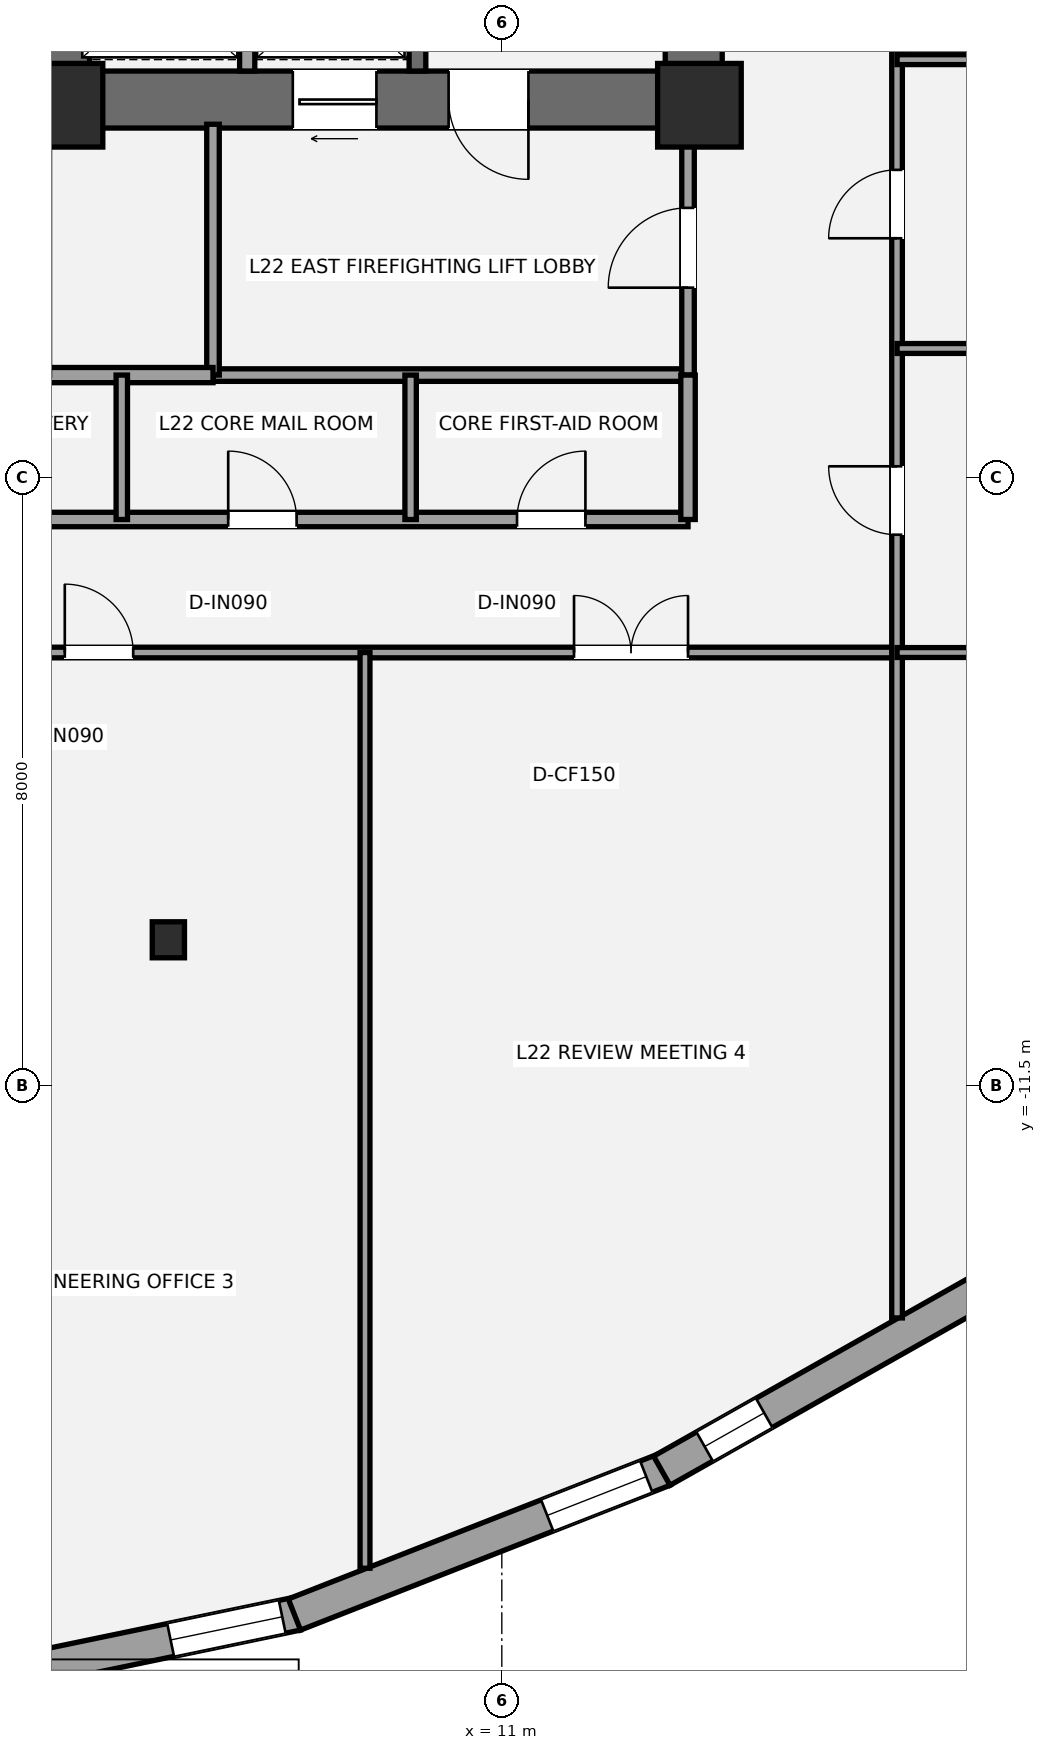
"""IFC4 building model, lengths in metres.
Left out: names, types, materials, properties, quantities, classifications, styles, units other than length and angle.
Written with IfcOpenShell. Run it as: python <this file> out.ifc"""

import sys

from ifc_helpers import new_model, si_unit, direction, frame, frame_2d, origin, origin_2d, place, context, subcontext, project, spatial, rectangle, i_section, extrude, element, fill, save


model = new_model("IFC4")
c1 = context("Model", 3, precision=1e-05, world=origin(), true_north=direction((0.0, 1.0)))
c2 = subcontext(c1, "Body", "Model", "MODEL_VIEW")
j1 = project(units=[si_unit("LENGTHUNIT", "METRE"), si_unit("PLANEANGLEUNIT", "RADIAN")], contexts=[c1])
p1 = place(None, origin())
s1 = spatial("IfcSite", under=j1, at=p1, CompositionType="ELEMENT")
p2 = place(p1, origin())
s2 = spatial("IfcBuilding", under=s1, at=p2, CompositionType="ELEMENT")
p3 = place(p2, frame((0.0, 0.0, 86.1)))
s3 = spatial("IfcBuildingStorey", under=s2, at=p3, CompositionType="ELEMENT", Elevation=86.1)
p4 = place(p3, frame((13.525, 1.1, 0.0), z_axis=(0.0, 0.0, 1.0), x_axis=(0.0, 1.0, 0.0)))
e1 = element("IfcWall", 1, at=p4, inside=s3, PredefinedType="SHEAR", context=c2, shape_type="SweptSolid", body=[
    extrude(rectangle(XDim=8.65, YDim=0.75, at=frame_2d((4.325, 0.0))), origin(), (0.0, 0.0, 1.0), 3.5),
])
p5 = place(p3, frame((13.9, 1.475, 0.0), z_axis=(0.0, 0.0, 1.0), x_axis=(-1.0, 0.0, 0.0)))
e2 = element("IfcWall", 2, at=p5, inside=s3, PredefinedType="SHEAR", context=c2, shape_type="SweptSolid", body=[
    extrude(rectangle(XDim=9.075, YDim=0.75, at=frame_2d((4.538, 0.0))), origin(), (0.0, 0.0, 1.0), 3.5),
])
p6 = place(p5, frame((2.55, 0.0, 0.0)))
e3 = element("IfcOpeningElement", 3, at=p6, cuts=e2, PredefinedType="OPENING", context=c2, shape_type="SweptSolid", body=[
    extrude(rectangle(XDim=1.05, YDim=2.15, at=frame_2d((0.525, 1.075))), frame((0.0, 0.385, 0.0), z_axis=(0.0, -1.0, 0.0), x_axis=(1.0, 0.0, 0.0)), (0.0, 0.0, 1.0), 0.77),
])
p7 = place(p5, frame((4.55, 0.0, 0.0)))
e4 = element("IfcOpeningElement", 4, at=p7, cuts=e2, PredefinedType="OPENING", context=c2, shape_type="SweptSolid", body=[
    extrude(rectangle(XDim=1.1, YDim=2.2, at=frame_2d((0.55, 1.1))), frame((0.0, 0.385, 0.0), z_axis=(0.0, -1.0, 0.0), x_axis=(1.0, 0.0, 0.0)), (0.0, 0.0, 1.0), 0.77),
])
p8 = place(p3, frame((5.2, 1.1, 0.0), z_axis=(0.0, 0.0, 1.0), x_axis=(0.0, 1.0, 0.0)))
e5 = element("IfcWall", 5, at=p8, inside=s3, PredefinedType="SHEAR", context=c2, shape_type="SweptSolid", body=[
    extrude(rectangle(XDim=2.7, YDim=0.75, at=frame_2d((1.35, 0.0))), origin(), (0.0, 0.0, 1.0), 3.5),
])
p9 = place(p3, frame((9.89, 1.85, 0.0), z_axis=(0.0, 0.0, 1.0), x_axis=(0.0, 1.0, 0.0)))
e6 = element("IfcWall", 6, at=p9, inside=s3, PredefinedType="SHEAR", context=c2, shape_type="SweptSolid", body=[
    extrude(rectangle(XDim=7.15, YDim=0.22, at=frame_2d((3.575, 0.0))), origin(), (0.0, 0.0, 1.0), 3.5),
])
for number, where, z_axis, x_axis in (
    (7, (5.2, 1.4, 0.0), (0.0, 0.0, 1.0), (1.0, 0.0, 0.0)),
    (8, (13.6, 1.4, 0.0), (0.0, 0.0, 1.0), (1.0, 0.0, 0.0)),
):
    element("IfcColumn", number, at=place(p3, frame(where, z_axis=z_axis, x_axis=x_axis)), inside=s3, PredefinedType="COLUMN", context=c2, shape_type="SweptSolid", body=[
        extrude(rectangle(XDim=1.1, YDim=1.1, at=origin_2d()), origin(), (0.0, 0.0, 1.0), 3.5),
    ])
p10 = place(p3, frame((6.613, -9.579, 0.0), z_axis=(0.0, 0.0, 1.0), x_axis=(1.0, 0.0, 0.0)))
e9 = element("IfcColumn", 9, at=p10, inside=s3, PredefinedType="COLUMN", context=c2, shape_type="SweptSolid", body=[
    extrude(i_section(OverallWidth=0.424, OverallDepth=0.474, WebThickness=0.048, FlangeThickness=0.077, at=origin_2d()), origin(), (0.0, 0.0, 1.0), 3.5),
])
p11 = place(p3, frame((8.307, -18.446, 0.0), z_axis=(0.0, 0.0, 1.0), x_axis=(-0.979118590293, -0.20328990664, 0.0)))
e10 = element("IfcWall", 10, at=p11, inside=s3, PredefinedType="STANDARD", context=c2, shape_type="SweptSolid", body=[
    extrude(rectangle(XDim=5.592, YDim=0.44, at=frame_2d((2.796, 0.0))), origin(), (0.0, 0.0, 1.0), 2.528),
])
p12 = place(p11, frame((0.2, 0.0, 0.65)))
e11 = element("IfcOpeningElement", 11, at=p12, cuts=e10, PredefinedType="OPENING", context=c2, shape_type="SweptSolid", body=[
    extrude(rectangle(XDim=1.5, YDim=1.7, at=frame_2d((0.75, 0.85))), frame((0.0, 0.23, 0.0), z_axis=(0.0, -1.0, 0.0), x_axis=(1.0, 0.0, 0.0)), (0.0, 0.0, 1.0), 0.46),
])
p13 = place(p3, frame((13.133, -16.551, 0.0), z_axis=(0.0, 0.0, 1.0), x_axis=(-0.931059171354, -0.364868222017, 0.0)))
e12 = element("IfcWall", 12, at=p13, inside=s3, PredefinedType="STANDARD", context=c2, shape_type="SweptSolid", body=[
    extrude(rectangle(XDim=5.222, YDim=0.44, at=frame_2d((2.611, 0.0))), origin(), (0.0, 0.0, 1.0), 2.528),
])
p14 = place(p13, frame((0.25, 0.0, 0.58)))
e13 = element("IfcOpeningElement", 13, at=p14, cuts=e12, PredefinedType="OPENING", context=c2, shape_type="SweptSolid", body=[
    extrude(rectangle(XDim=1.4, YDim=1.55, at=frame_2d((0.7, 0.775))), frame((0.0, 0.23, 0.0), z_axis=(0.0, -1.0, 0.0), x_axis=(1.0, 0.0, 0.0)), (0.0, 0.0, 1.0), 0.46),
])
p15 = place(p3, frame((17.306, -14.191, 0.0), z_axis=(0.0, 0.0, 1.0), x_axis=(-0.870732411856, -0.491757121903, 0.0)))
e14 = element("IfcWall", 14, at=p15, inside=s3, PredefinedType="STANDARD", context=c2, shape_type="SweptSolid", body=[
    extrude(rectangle(XDim=4.825, YDim=0.44, at=frame_2d((2.413, 0.0))), origin(), (0.0, 0.0, 1.0), 2.528),
])
p16 = place(p15, frame((3.278, 0.0, 0.58)))
e15 = element("IfcOpeningElement", 15, at=p16, cuts=e14, PredefinedType="OPENING", context=c2, shape_type="SweptSolid", body=[
    extrude(rectangle(XDim=0.9, YDim=1.35, at=frame_2d((0.45, 0.675))), frame((0.0, 0.23, 0.0), z_axis=(0.0, -1.0, 0.0), x_axis=(1.0, 0.0, 0.0)), (0.0, 0.0, 1.0), 0.46),
])
p17 = place(p3, frame((7.2, -2.15, 0.0), z_axis=(0.0, 0.0, 1.0), x_axis=(1.0, 0.0, 0.0)))
e16 = element("IfcWall", 16, at=p17, inside=s3, PredefinedType="PARTITIONING", context=c2, shape_type="SweptSolid", body=[
    extrude(rectangle(XDim=6.25, YDim=0.165, at=frame_2d((3.125, 0.0))), origin(), (0.0, 0.0, 1.0), 3.31),
])
p18 = place(p3, frame((7.2, -2.15, 0.0), z_axis=(0.0, 0.0, 1.0), x_axis=(0.0, 1.0, 0.0)))
e17 = element("IfcWall", 17, at=p18, inside=s3, PredefinedType="PARTITIONING", context=c2, shape_type="SweptSolid", body=[
    extrude(rectangle(XDim=3.3, YDim=0.165, at=frame_2d((1.65, 0.0))), origin(), (0.0, 0.0, 1.0), 2.763),
])
p19 = place(p3, frame((13.45, -2.15, 0.0), z_axis=(0.0, 0.0, 1.0), x_axis=(0.0, 1.0, 0.0)))
e18 = element("IfcWall", 18, at=p19, inside=s3, PredefinedType="PARTITIONING", context=c2, shape_type="SweptSolid", body=[
    extrude(rectangle(XDim=3.3, YDim=0.165, at=frame_2d((1.65, 0.0))), origin(), (0.0, 0.0, 1.0), 2.763),
])
p20 = place(p19, frame((1.15, 0.0, 0.0)))
e19 = element("IfcOpeningElement", 19, at=p20, cuts=e18, PredefinedType="OPENING", context=c2, shape_type="SweptSolid", body=[
    extrude(rectangle(XDim=1.05, YDim=2.15, at=frame_2d((0.525, 1.075))), frame((0.0, 0.093, 0.0), z_axis=(0.0, -1.0, 0.0), x_axis=(1.0, 0.0, 0.0)), (0.0, 0.0, 1.0), 0.185),
])
p21 = place(p3, frame((4.95, -2.15, 0.0), z_axis=(0.0, 0.0, 1.0), x_axis=(1.0, 0.0, 0.0)))
e20 = element("IfcWall", 20, at=p21, inside=s3, PredefinedType="SOLIDWALL", context=c2, shape_type="SweptSolid", body=[
    extrude(rectangle(XDim=2.25, YDim=0.2, at=frame_2d((1.125, 0.0))), origin(), (0.0, 0.0, 1.0), 3.31),
])
p22 = place(p3, frame((7.65, 1.85, 0.0), z_axis=(0.0, 0.0, 1.0), x_axis=(0.0, 1.0, 0.0)))
e21 = element("IfcWall", 21, at=p22, inside=s3, PredefinedType="SOLIDWALL", context=c2, shape_type="SweptSolid", body=[
    extrude(rectangle(XDim=1.97, YDim=0.2, at=frame_2d((0.985, 0.0))), origin(), (0.0, 0.0, 1.0), 3.31),
])
p23 = place(p3, frame((2.1, -4.05, 0.0), z_axis=(0.0, 0.0, 1.0), x_axis=(1.0, 0.0, 0.0)))
e22 = element("IfcWall", 22, at=p23, inside=s3, PredefinedType="PLUMBINGWALL", context=c2, shape_type="SweptSolid", body=[
    extrude(rectangle(XDim=11.35, YDim=0.19, at=frame_2d((5.675, 0.0))), origin(), (0.0, 0.0, 1.0), 2.763),
])
p24 = place(p23, frame((1.4, 0.0, 0.0)))
e23 = element("IfcOpeningElement", 23, at=p24, cuts=e22, PredefinedType="OPENING", context=c2, shape_type="SweptSolid", body=[
    extrude(rectangle(XDim=0.9, YDim=2.1, at=frame_2d((0.45, 1.05))), frame((0.0, 0.105, 0.0), z_axis=(0.0, -1.0, 0.0), x_axis=(1.0, 0.0, 0.0)), (0.0, 0.0, 1.0), 0.21),
])
p25 = place(p23, frame((5.3, 0.0, 0.0)))
e24 = element("IfcOpeningElement", 24, at=p25, cuts=e22, PredefinedType="OPENING", context=c2, shape_type="SweptSolid", body=[
    extrude(rectangle(XDim=0.9, YDim=2.1, at=frame_2d((0.45, 1.05))), frame((0.0, 0.105, 0.0), z_axis=(0.0, -1.0, 0.0), x_axis=(1.0, 0.0, 0.0)), (0.0, 0.0, 1.0), 0.21),
])
p26 = place(p23, frame((9.1, 0.0, 0.0)))
e25 = element("IfcOpeningElement", 25, at=p26, cuts=e22, PredefinedType="OPENING", context=c2, shape_type="SweptSolid", body=[
    extrude(rectangle(XDim=0.9, YDim=2.1, at=frame_2d((0.45, 1.05))), frame((0.0, 0.105, 0.0), z_axis=(0.0, -1.0, 0.0), x_axis=(1.0, 0.0, 0.0)), (0.0, 0.0, 1.0), 0.21),
])
p27 = place(p3, frame((13.45, -4.05, 0.0), z_axis=(0.0, 0.0, 1.0), x_axis=(0.0, 1.0, 0.0)))
e26 = element("IfcWall", 26, at=p27, inside=s3, PredefinedType="PLUMBINGWALL", context=c2, shape_type="SweptSolid", body=[
    extrude(rectangle(XDim=1.9, YDim=0.19, at=frame_2d((0.95, 0.0))), origin(), (0.0, 0.0, 1.0), 3.31),
])
p28 = place(p3, frame((6.0, -4.05, 0.0), z_axis=(0.0, 0.0, 1.0), x_axis=(0.0, 1.0, 0.0)))
e27 = element("IfcWall", 27, at=p28, inside=s3, PredefinedType="PLUMBINGWALL", context=c2, shape_type="SweptSolid", body=[
    extrude(rectangle(XDim=1.9, YDim=0.15, at=frame_2d((0.95, 0.0))), origin(), (0.0, 0.0, 1.0), 2.751),
])
p29 = place(p3, frame((9.8, -4.05, 0.0), z_axis=(0.0, 0.0, 1.0), x_axis=(0.0, 1.0, 0.0)))
e28 = element("IfcWall", 28, at=p29, inside=s3, PredefinedType="PLUMBINGWALL", context=c2, shape_type="SweptSolid", body=[
    extrude(rectangle(XDim=1.9, YDim=0.15, at=frame_2d((0.95, 0.0))), origin(), (0.0, 0.0, 1.0), 3.31),
])
p30 = place(p3, frame((-16.2, -5.8, 0.0), z_axis=(0.0, 0.0, 1.0), x_axis=(1.0, 0.0, 0.0)))
e29 = element("IfcWall", 29, at=p30, inside=s3, PredefinedType="PARTITIONING", context=c2, shape_type="SweptSolid", body=[
    extrude(rectangle(XDim=32.4, YDim=0.14, at=frame_2d((16.2, 0.0))), origin(), (0.0, 0.0, 1.0), 2.763),
])
p31 = place(p30, frame((4.25, 0.0, 0.0)))
e30 = element("IfcOpeningElement", 30, at=p31, cuts=e29, PredefinedType="OPENING", context=c2, shape_type="SweptSolid", body=[
    extrude(rectangle(XDim=0.9, YDim=2.1, at=frame_2d((0.45, 1.05))), frame((0.0, 0.08, 0.0), z_axis=(0.0, -1.0, 0.0), x_axis=(1.0, 0.0, 0.0)), (0.0, 0.0, 1.0), 0.16),
])
p32 = place(p30, frame((13.15, 0.0, 0.0)))
e31 = element("IfcOpeningElement", 31, at=p32, cuts=e29, PredefinedType="OPENING", context=c2, shape_type="SweptSolid", body=[
    extrude(rectangle(XDim=1.5, YDim=2.15, at=frame_2d((0.75, 1.075))), frame((0.0, 0.08, 0.0), z_axis=(0.0, -1.0, 0.0), x_axis=(1.0, 0.0, 0.0)), (0.0, 0.0, 1.0), 0.16),
])
p33 = place(p30, frame((21.45, 0.0, 0.0)))
e32 = element("IfcOpeningElement", 32, at=p33, cuts=e29, PredefinedType="OPENING", context=c2, shape_type="SweptSolid", body=[
    extrude(rectangle(XDim=0.9, YDim=2.1, at=frame_2d((0.45, 1.05))), frame((0.0, 0.08, 0.0), z_axis=(0.0, -1.0, 0.0), x_axis=(1.0, 0.0, 0.0)), (0.0, 0.0, 1.0), 0.16),
])
p34 = place(p30, frame((28.15, 0.0, 0.0)))
e33 = element("IfcOpeningElement", 33, at=p34, cuts=e29, PredefinedType="OPENING", context=c2, shape_type="SweptSolid", body=[
    extrude(rectangle(XDim=1.5, YDim=2.15, at=frame_2d((0.75, 1.075))), frame((0.0, 0.08, 0.0), z_axis=(0.0, -1.0, 0.0), x_axis=(1.0, 0.0, 0.0)), (0.0, 0.0, 1.0), 0.16),
])
p35 = place(p3, frame((16.2, -14.554, 0.0), z_axis=(0.0, 0.0, 1.0), x_axis=(0.0, 1.0, 0.0)))
e34 = element("IfcWall", 34, at=p35, inside=s3, PredefinedType="PARTITIONING", context=c2, shape_type="SweptSolid", body=[
    extrude(rectangle(XDim=22.104, YDim=0.14, at=frame_2d((11.052, 0.0))), origin(), (0.0, 0.0, 1.0), 2.751),
])
p36 = place(p35, frame((10.304, 0.0, 0.0)))
e35 = element("IfcOpeningElement", 35, at=p36, cuts=e34, PredefinedType="OPENING", context=c2, shape_type="SweptSolid", body=[
    extrude(rectangle(XDim=0.9, YDim=2.1, at=frame_2d((0.45, 1.05))), frame((0.0, 0.08, 0.0), z_axis=(0.0, -1.0, 0.0), x_axis=(1.0, 0.0, 0.0)), (0.0, 0.0, 1.0), 0.16),
])
p37 = place(p35, frame((14.204, 0.0, 0.0)))
e36 = element("IfcOpeningElement", 36, at=p37, cuts=e34, PredefinedType="OPENING", context=c2, shape_type="SweptSolid", body=[
    extrude(rectangle(XDim=0.9, YDim=2.1, at=frame_2d((0.45, 1.05))), frame((0.0, 0.08, 0.0), z_axis=(0.0, -1.0, 0.0), x_axis=(1.0, 0.0, 0.0)), (0.0, 0.0, 1.0), 0.16),
])
p38 = place(p35, frame((17.704, 0.0, 0.0)))
e37 = element("IfcOpeningElement", 37, at=p38, cuts=e34, PredefinedType="OPENING", context=c2, shape_type="SweptSolid", body=[
    extrude(rectangle(XDim=0.9, YDim=2.1, at=frame_2d((0.45, 1.05))), frame((0.0, 0.08, 0.0), z_axis=(0.0, -1.0, 0.0), x_axis=(1.0, 0.0, 0.0)), (0.0, 0.0, 1.0), 0.16),
])
p39 = place(p35, frame((20.479, 0.0, 0.0)))
e38 = element("IfcOpeningElement", 38, at=p39, cuts=e34, PredefinedType="OPENING", context=c2, shape_type="SweptSolid", body=[
    extrude(rectangle(XDim=0.9, YDim=2.1, at=frame_2d((0.45, 1.05))), frame((0.0, 0.08, 0.0), z_axis=(0.0, -1.0, 0.0), x_axis=(1.0, 0.0, 0.0)), (0.0, 0.0, 1.0), 0.16),
])
p40 = place(p3, frame((9.2, -17.847, 0.0), z_axis=(0.0, 0.0, 1.0), x_axis=(0.0, 1.0, 0.0)))
e39 = element("IfcWall", 39, at=p40, inside=s3, PredefinedType="PARTITIONING", context=c2, shape_type="SweptSolid", body=[
    extrude(rectangle(XDim=12.047, YDim=0.13, at=frame_2d((6.024, 0.0))), origin(), (0.0, 0.0, 1.0), 3.31),
])
p41 = place(p3, frame((16.2, -5.8, 0.0), z_axis=(0.0, 0.0, 1.0), x_axis=(1.0, 0.0, 0.0)))
e40 = element("IfcWall", 40, at=p41, inside=s3, PredefinedType="PARTITIONING", context=c2, shape_type="SweptSolid", body=[
    extrude(rectangle(XDim=10.624, YDim=0.13, at=frame_2d((5.312, 0.0))), origin(), (0.0, 0.0, 1.0), 2.688),
])
p42 = place(p41, frame((1.73, 0.0, 0.0)))
e41 = element("IfcOpeningElement", 41, at=p42, cuts=e40, PredefinedType="OPENING", context=c2, shape_type="SweptSolid", body=[
    extrude(rectangle(XDim=0.9, YDim=2.1, at=frame_2d((0.45, 1.05))), frame((0.0, 0.075, 0.0), z_axis=(0.0, -1.0, 0.0), x_axis=(1.0, 0.0, 0.0)), (0.0, 0.0, 1.0), 0.15),
])
p43 = place(p3, frame((16.2, -1.8, 0.0), z_axis=(0.0, 0.0, 1.0), x_axis=(1.0, 0.0, 0.0)))
e42 = element("IfcWall", 42, at=p43, inside=s3, PredefinedType="PARTITIONING", context=c2, shape_type="SweptSolid", body=[
    extrude(rectangle(XDim=12.56, YDim=0.13, at=frame_2d((6.28, 0.0))), origin(), (0.0, 0.0, 1.0), 2.751),
])
p44 = place(p3, frame((16.2, 2.0, 0.0), z_axis=(0.0, 0.0, 1.0), x_axis=(1.0, 0.0, 0.0)))
e43 = element("IfcWall", 43, at=p44, inside=s3, PredefinedType="PARTITIONING", context=c2, shape_type="SweptSolid", body=[
    extrude(rectangle(XDim=12.494, YDim=0.13, at=frame_2d((6.247, 0.0))), origin(), (0.0, 0.0, 1.0), 2.751),
])
p45 = place(p12, origin())
e44 = element("IfcWindow", 44, at=p45, inside=s3, PartitioningType="SINGLE_PANEL", PredefinedType="WINDOW", context=c2, shape_type="SweptSolid", body=[
    extrude(rectangle(XDim=1.5, YDim=1.7, at=frame_2d((0.75, 0.85))), frame((0.0, -0.01, 0.0), z_axis=(0.0, -1.0, 0.0), x_axis=(1.0, 0.0, 0.0)), (0.0, 0.0, 1.0), 0.06),
])
fill(e11, e44)
p46 = place(p14, origin())
e45 = element("IfcWindow", 45, at=p46, inside=s3, PartitioningType="SINGLE_PANEL", PredefinedType="WINDOW", context=c2, shape_type="SweptSolid", body=[
    extrude(rectangle(XDim=1.4, YDim=1.55, at=frame_2d((0.7, 0.775))), frame((0.0, -0.01, 0.0), z_axis=(0.0, -1.0, 0.0), x_axis=(1.0, 0.0, 0.0)), (0.0, 0.0, 1.0), 0.06),
])
fill(e13, e45)
p47 = place(p16, origin())
e46 = element("IfcWindow", 46, at=p47, inside=s3, PartitioningType="SINGLE_PANEL", PredefinedType="WINDOW", context=c2, shape_type="SweptSolid", body=[
    extrude(rectangle(XDim=0.9, YDim=1.35, at=frame_2d((0.45, 0.675))), frame((0.0, -0.01, 0.0), z_axis=(0.0, -1.0, 0.0), x_axis=(1.0, 0.0, 0.0)), (0.0, 0.0, 1.0), 0.06),
])
fill(e15, e46)
p48 = place(p6, origin())
e47 = element("IfcDoor", 47, at=p48, inside=s3, OperationType="SINGLE_SWING_LEFT", PredefinedType="DOOR", context=c2, shape_type="SweptSolid", body=[
    extrude(rectangle(XDim=1.05, YDim=2.15, at=frame_2d((0.525, 1.075))), frame((0.0, 0.025, 0.0), z_axis=(0.0, -1.0, 0.0), x_axis=(1.0, 0.0, 0.0)), (0.0, 0.0, 1.0), 0.05),
])
fill(e3, e47)
p49 = place(p20, origin())
e48 = element("IfcDoor", 48, at=p49, inside=s3, OperationType="SINGLE_SWING_LEFT", PredefinedType="DOOR", context=c2, shape_type="SweptSolid", body=[
    extrude(rectangle(XDim=1.05, YDim=2.15, at=frame_2d((0.525, 1.075))), frame((0.0, 0.025, 0.0), z_axis=(0.0, -1.0, 0.0), x_axis=(1.0, 0.0, 0.0)), (0.0, 0.0, 1.0), 0.05),
])
fill(e19, e48)
p50 = place(p7, origin())
e49 = element("IfcDoor", 49, at=p50, inside=s3, OperationType="SLIDING_TO_LEFT", PredefinedType="DOOR", context=c2, shape_type="SweptSolid", body=[
    extrude(rectangle(XDim=1.1, YDim=2.2, at=frame_2d((0.55, 1.1))), frame((0.0, 0.025, 0.0), z_axis=(0.0, -1.0, 0.0), x_axis=(1.0, 0.0, 0.0)), (0.0, 0.0, 1.0), 0.05),
])
fill(e4, e49)
p51 = place(p25, origin())
e50 = element("IfcDoor", 50, at=p51, inside=s3, OperationType="SINGLE_SWING_LEFT", PredefinedType="DOOR", context=c2, shape_type="SweptSolid", body=[
    extrude(rectangle(XDim=0.9, YDim=2.1, at=frame_2d((0.45, 1.05))), frame((0.0, 0.025, 0.0), z_axis=(0.0, -1.0, 0.0), x_axis=(1.0, 0.0, 0.0)), (0.0, 0.0, 1.0), 0.05),
])
fill(e24, e50)
p52 = place(p26, origin())
e51 = element("IfcDoor", 51, at=p52, inside=s3, OperationType="SINGLE_SWING_RIGHT", PredefinedType="DOOR", context=c2, shape_type="SweptSolid", body=[
    extrude(rectangle(XDim=0.9, YDim=2.1, at=frame_2d((0.45, 1.05))), frame((0.0, 0.025, 0.0), z_axis=(0.0, -1.0, 0.0), x_axis=(1.0, 0.0, 0.0)), (0.0, 0.0, 1.0), 0.05),
])
fill(e25, e51)
p53 = place(p33, origin())
e52 = element("IfcDoor", 52, at=p53, inside=s3, OperationType="SINGLE_SWING_LEFT", PredefinedType="DOOR", context=c2, shape_type="SweptSolid", body=[
    extrude(rectangle(XDim=0.9, YDim=2.1, at=frame_2d((0.45, 1.05))), frame((0.0, 0.025, 0.0), z_axis=(0.0, -1.0, 0.0), x_axis=(1.0, 0.0, 0.0)), (0.0, 0.0, 1.0), 0.05),
])
fill(e32, e52)
p54 = place(p34, origin())
e53 = element("IfcDoor", 53, at=p54, inside=s3, OperationType="DOUBLE_DOOR_SINGLE_SWING", PredefinedType="DOOR", context=c2, shape_type="SweptSolid", body=[
    extrude(rectangle(XDim=1.5, YDim=2.15, at=frame_2d((0.75, 1.075))), frame((0.0, 0.025, 0.0), z_axis=(0.0, -1.0, 0.0), x_axis=(1.0, 0.0, 0.0)), (0.0, 0.0, 1.0), 0.05),
])
fill(e33, e53)
p55 = place(p36, origin())
e54 = element("IfcDoor", 54, at=p55, inside=s3, OperationType="SINGLE_SWING_RIGHT", PredefinedType="DOOR", context=c2, shape_type="SweptSolid", body=[
    extrude(rectangle(XDim=0.9, YDim=2.1, at=frame_2d((0.45, 1.05))), frame((0.0, 0.025, 0.0), z_axis=(0.0, -1.0, 0.0), x_axis=(1.0, 0.0, 0.0)), (0.0, 0.0, 1.0), 0.05),
])
fill(e35, e54)
p56 = place(p37, origin())
e55 = element("IfcDoor", 55, at=p56, inside=s3, OperationType="SINGLE_SWING_LEFT", PredefinedType="DOOR", context=c2, shape_type="SweptSolid", body=[
    extrude(rectangle(XDim=0.9, YDim=2.1, at=frame_2d((0.45, 1.05))), frame((0.0, 0.025, 0.0), z_axis=(0.0, -1.0, 0.0), x_axis=(1.0, 0.0, 0.0)), (0.0, 0.0, 1.0), 0.05),
])
fill(e36, e55)
save(model, sys.argv[1])
